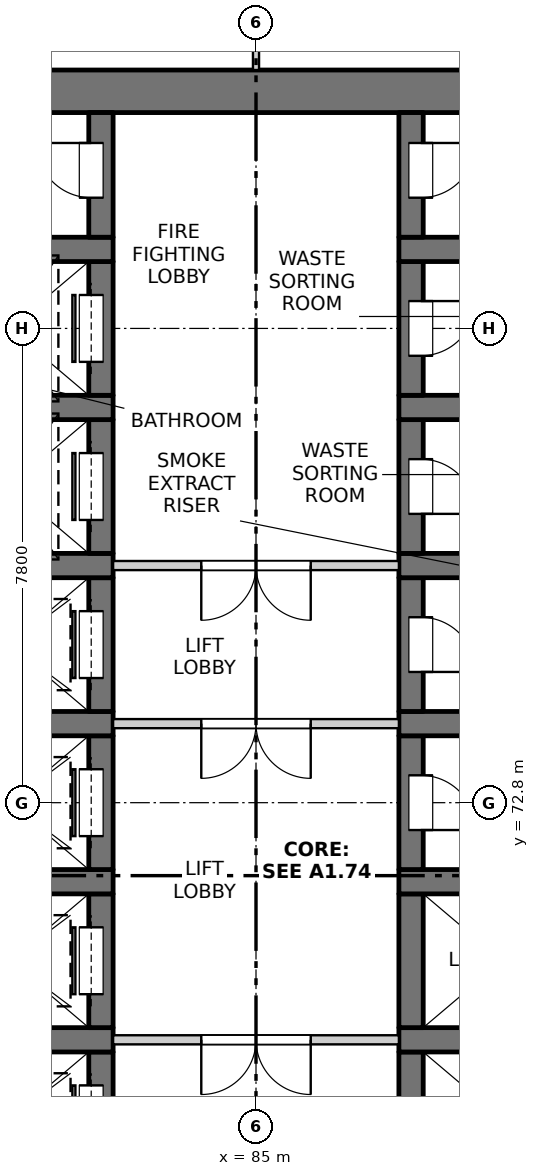
"""IFC4 building model, lengths in metres.
Left out: names, types, materials, properties, quantities, classifications, styles, units other than length and angle.
Written with IfcOpenShell. Run it as: python <this file> out.ifc"""

import sys

from ifc_helpers import new_model, si_unit, direction, frame, frame_2d, origin, place, context, subcontext, project, spatial, rectangle, extrude, element, fill, save


model = new_model("IFC4")
c1 = context("Model", 3, precision=1e-05, world=origin(), true_north=direction((0.0, 1.0)))
c2 = subcontext(c1, "Body", "Model", "MODEL_VIEW")
j1 = project(units=[si_unit("LENGTHUNIT", "METRE"), si_unit("PLANEANGLEUNIT", "RADIAN")], contexts=[c1])
p1 = place(None, origin())
s1 = spatial("IfcSite", under=j1, at=p1, CompositionType="ELEMENT")
p2 = place(p1, origin())
s2 = spatial("IfcBuilding", under=s1, at=p2, CompositionType="ELEMENT")
p3 = place(p2, frame((0.0, 0.0, 36.5)))
s3 = spatial("IfcBuildingStorey", under=s2, at=p3, CompositionType="ELEMENT", Elevation=36.5)
p4 = place(p3, frame((75.6, 84.5, -0.25), z_axis=(0.0, 0.0, 1.0), x_axis=(1.0, 0.0, 0.0)))
e1 = element("IfcWall", 1, at=p4, inside=s3, PredefinedType="SOLIDWALL", context=c2, shape_type="SweptSolid", body=[
    extrude(rectangle(XDim=18.8, YDim=0.7, at=frame_2d((9.4, 0.0))), origin(), (0.0, 0.0, 1.0), 3.4),
])
p5 = place(p3, frame((82.45, 66.5, -0.25), z_axis=(0.0, 0.0, 1.0), x_axis=(0.0, 1.0, 0.0)))
e2 = element("IfcWall", 2, at=p5, inside=s3, PredefinedType="SOLIDWALL", context=c2, shape_type="SweptSolid", body=[
    extrude(rectangle(XDim=2.2, YDim=0.4, at=frame_2d((1.1, 0.0))), origin(), (0.0, 0.0, 1.0), 3.4),
])
p6 = place(p5, frame((0.55, 0.0, 0.25)))
e3 = element("IfcOpeningElement", 3, at=p6, cuts=e2, PredefinedType="OPENING", context=c2, shape_type="SweptSolid", body=[
    extrude(rectangle(XDim=1.1, YDim=2.1, at=frame_2d((0.55, 1.05))), frame((0.0, 0.21, 0.0), z_axis=(0.0, -1.0, 0.0), x_axis=(1.0, 0.0, 0.0)), (0.0, 0.0, 1.0), 0.42),
])
p7 = place(p3, frame((79.65, 68.9, -0.25), z_axis=(0.0, 0.0, 1.0), x_axis=(1.0, 0.0, 0.0)))
e4 = element("IfcWall", 4, at=p7, inside=s3, PredefinedType="SOLIDWALL", context=c2, shape_type="SweptSolid", body=[
    extrude(rectangle(XDim=3.0, YDim=0.4, at=frame_2d((1.5, 0.0))), origin(), (0.0, 0.0, 1.0), 3.4),
])
p8 = place(p3, frame((82.45, 69.1, -0.25), z_axis=(0.0, 0.0, 1.0), x_axis=(0.0, 1.0, 0.0)))
e5 = element("IfcWall", 5, at=p8, inside=s3, PredefinedType="SOLIDWALL", context=c2, shape_type="SweptSolid", body=[
    extrude(rectangle(XDim=2.2, YDim=0.4, at=frame_2d((1.1, 0.0))), origin(), (0.0, 0.0, 1.0), 3.4),
])
p9 = place(p8, frame((0.55, 0.0, 0.25)))
e6 = element("IfcOpeningElement", 6, at=p9, cuts=e5, PredefinedType="OPENING", context=c2, shape_type="SweptSolid", body=[
    extrude(rectangle(XDim=1.1, YDim=2.1, at=frame_2d((0.55, 1.05))), frame((0.0, 0.21, 0.0), z_axis=(0.0, -1.0, 0.0), x_axis=(1.0, 0.0, 0.0)), (0.0, 0.0, 1.0), 0.42),
])
p10 = place(p3, frame((79.65, 71.5, -0.25), z_axis=(0.0, 0.0, 1.0), x_axis=(1.0, 0.0, 0.0)))
e7 = element("IfcWall", 7, at=p10, inside=s3, PredefinedType="SOLIDWALL", context=c2, shape_type="SweptSolid", body=[
    extrude(rectangle(XDim=3.0, YDim=0.4, at=frame_2d((1.5, 0.0))), origin(), (0.0, 0.0, 1.0), 3.4),
])
p11 = place(p3, frame((82.45, 71.7, -0.25), z_axis=(0.0, 0.0, 1.0), x_axis=(0.0, 1.0, 0.0)))
e8 = element("IfcWall", 8, at=p11, inside=s3, PredefinedType="SOLIDWALL", context=c2, shape_type="SweptSolid", body=[
    extrude(rectangle(XDim=2.2, YDim=0.4, at=frame_2d((1.1, 0.0))), origin(), (0.0, 0.0, 1.0), 3.4),
])
p12 = place(p11, frame((0.55, 0.0, 0.25)))
e9 = element("IfcOpeningElement", 9, at=p12, cuts=e8, PredefinedType="OPENING", context=c2, shape_type="SweptSolid", body=[
    extrude(rectangle(XDim=1.1, YDim=2.1, at=frame_2d((0.55, 1.05))), frame((0.0, 0.21, 0.0), z_axis=(0.0, -1.0, 0.0), x_axis=(1.0, 0.0, 0.0)), (0.0, 0.0, 1.0), 0.42),
])
p13 = place(p3, frame((79.65, 74.1, -0.25), z_axis=(0.0, 0.0, 1.0), x_axis=(1.0, 0.0, 0.0)))
e10 = element("IfcWall", 10, at=p13, inside=s3, PredefinedType="SOLIDWALL", context=c2, shape_type="SweptSolid", body=[
    extrude(rectangle(XDim=3.0, YDim=0.4, at=frame_2d((1.5, 0.0))), origin(), (0.0, 0.0, 1.0), 3.4),
])
p14 = place(p3, frame((82.45, 74.3, -0.25), z_axis=(0.0, 0.0, 1.0), x_axis=(0.0, 1.0, 0.0)))
e11 = element("IfcWall", 11, at=p14, inside=s3, PredefinedType="SOLIDWALL", context=c2, shape_type="SweptSolid", body=[
    extrude(rectangle(XDim=2.2, YDim=0.4, at=frame_2d((1.1, 0.0))), origin(), (0.0, 0.0, 1.0), 3.4),
])
p15 = place(p14, frame((0.55, 0.0, 0.25)))
e12 = element("IfcOpeningElement", 12, at=p15, cuts=e11, PredefinedType="OPENING", context=c2, shape_type="SweptSolid", body=[
    extrude(rectangle(XDim=1.1, YDim=2.1, at=frame_2d((0.55, 1.05))), frame((0.0, 0.21, 0.0), z_axis=(0.0, -1.0, 0.0), x_axis=(1.0, 0.0, 0.0)), (0.0, 0.0, 1.0), 0.42),
])
p16 = place(p3, frame((79.65, 76.7, -0.25), z_axis=(0.0, 0.0, 1.0), x_axis=(1.0, 0.0, 0.0)))
e13 = element("IfcWall", 13, at=p16, inside=s3, PredefinedType="SOLIDWALL", context=c2, shape_type="SweptSolid", body=[
    extrude(rectangle(XDim=3.0, YDim=0.4, at=frame_2d((1.5, 0.0))), origin(), (0.0, 0.0, 1.0), 3.4),
])
p17 = place(p3, frame((82.45, 76.9, -0.25), z_axis=(0.0, 0.0, 1.0), x_axis=(0.0, 1.0, 0.0)))
e14 = element("IfcWall", 14, at=p17, inside=s3, PredefinedType="SOLIDWALL", context=c2, shape_type="SweptSolid", body=[
    extrude(rectangle(XDim=2.2, YDim=0.4, at=frame_2d((1.1, 0.0))), origin(), (0.0, 0.0, 1.0), 3.4),
])
p18 = place(p17, frame((0.55, 0.0, 0.25)))
e15 = element("IfcOpeningElement", 15, at=p18, cuts=e14, PredefinedType="OPENING", context=c2, shape_type="SweptSolid", body=[
    extrude(rectangle(XDim=1.1, YDim=2.1, at=frame_2d((0.55, 1.05))), frame((0.0, 0.21, 0.0), z_axis=(0.0, -1.0, 0.0), x_axis=(1.0, 0.0, 0.0)), (0.0, 0.0, 1.0), 0.42),
])
p19 = place(p3, frame((79.65, 79.3, -0.25), z_axis=(0.0, 0.0, 1.0), x_axis=(1.0, 0.0, 0.0)))
e16 = element("IfcWall", 16, at=p19, inside=s3, PredefinedType="SOLIDWALL", context=c2, shape_type="SweptSolid", body=[
    extrude(rectangle(XDim=3.0, YDim=0.4, at=frame_2d((1.5, 0.0))), origin(), (0.0, 0.0, 1.0), 3.4),
])
p20 = place(p3, frame((82.45, 79.5, -0.25), z_axis=(0.0, 0.0, 1.0), x_axis=(0.0, 1.0, 0.0)))
e17 = element("IfcWall", 17, at=p20, inside=s3, PredefinedType="SOLIDWALL", context=c2, shape_type="SweptSolid", body=[
    extrude(rectangle(XDim=2.2, YDim=0.4, at=frame_2d((1.1, 0.0))), origin(), (0.0, 0.0, 1.0), 3.4),
])
p21 = place(p20, frame((0.55, 0.0, 0.25)))
e18 = element("IfcOpeningElement", 18, at=p21, cuts=e17, PredefinedType="OPENING", context=c2, shape_type="SweptSolid", body=[
    extrude(rectangle(XDim=1.1, YDim=2.1, at=frame_2d((0.55, 1.05))), frame((0.0, 0.21, 0.0), z_axis=(0.0, -1.0, 0.0), x_axis=(1.0, 0.0, 0.0)), (0.0, 0.0, 1.0), 0.42),
])
p22 = place(p3, frame((79.65, 81.9, -0.25), z_axis=(0.0, 0.0, 1.0), x_axis=(1.0, 0.0, 0.0)))
e19 = element("IfcWall", 19, at=p22, inside=s3, PredefinedType="SOLIDWALL", context=c2, shape_type="SweptSolid", body=[
    extrude(rectangle(XDim=3.0, YDim=0.4, at=frame_2d((1.5, 0.0))), origin(), (0.0, 0.0, 1.0), 3.4),
])
p23 = place(p3, frame((82.45, 82.1, -0.25), z_axis=(0.0, 0.0, 1.0), x_axis=(0.0, 1.0, 0.0)))
e20 = element("IfcWall", 20, at=p23, inside=s3, PredefinedType="SOLIDWALL", context=c2, shape_type="SweptSolid", body=[
    extrude(rectangle(XDim=2.05, YDim=0.4, at=frame_2d((1.025, 0.0))), origin(), (0.0, 0.0, 1.0), 3.4),
])
p24 = place(p23, frame((0.65, 0.0, 0.25)))
e21 = element("IfcOpeningElement", 21, at=p24, cuts=e20, PredefinedType="OPENING", context=c2, shape_type="SweptSolid", body=[
    extrude(rectangle(XDim=0.9, YDim=2.1, at=frame_2d((0.45, 1.05))), frame((0.0, 0.21, 0.0), z_axis=(0.0, -1.0, 0.0), x_axis=(1.0, 0.0, 0.0)), (0.0, 0.0, 1.0), 0.42),
])
p25 = place(p3, frame((87.55, 66.5, -0.25), z_axis=(0.0, 0.0, 1.0), x_axis=(0.0, 1.0, 0.0)))
e22 = element("IfcWall", 22, at=p25, inside=s3, PredefinedType="SOLIDWALL", context=c2, shape_type="SweptSolid", body=[
    extrude(rectangle(XDim=2.2, YDim=0.4, at=frame_2d((1.1, 0.0))), origin(), (0.0, 0.0, 1.0), 3.4),
])
p26 = place(p3, frame((87.35, 68.9, -0.25), z_axis=(0.0, 0.0, 1.0), x_axis=(1.0, 0.0, 0.0)))
e23 = element("IfcWall", 23, at=p26, inside=s3, PredefinedType="SOLIDWALL", context=c2, shape_type="SweptSolid", body=[
    extrude(rectangle(XDim=3.0, YDim=0.4, at=frame_2d((1.5, 0.0))), origin(), (0.0, 0.0, 1.0), 3.4),
])
p27 = place(p3, frame((87.55, 69.1, -0.25), z_axis=(0.0, 0.0, 1.0), x_axis=(0.0, 1.0, 0.0)))
e24 = element("IfcWall", 24, at=p27, inside=s3, PredefinedType="SOLIDWALL", context=c2, shape_type="SweptSolid", body=[
    extrude(rectangle(XDim=2.2, YDim=0.4, at=frame_2d((1.1, 0.0))), origin(), (0.0, 0.0, 1.0), 3.4),
])
p28 = place(p3, frame((87.35, 71.5, -0.25), z_axis=(0.0, 0.0, 1.0), x_axis=(1.0, 0.0, 0.0)))
e25 = element("IfcWall", 25, at=p28, inside=s3, PredefinedType="SOLIDWALL", context=c2, shape_type="SweptSolid", body=[
    extrude(rectangle(XDim=3.0, YDim=0.4, at=frame_2d((1.5, 0.0))), origin(), (0.0, 0.0, 1.0), 3.4),
])
p29 = place(p3, frame((87.55, 71.7, -0.25), z_axis=(0.0, 0.0, 1.0), x_axis=(0.0, 1.0, 0.0)))
e26 = element("IfcWall", 26, at=p29, inside=s3, PredefinedType="SOLIDWALL", context=c2, shape_type="SweptSolid", body=[
    extrude(rectangle(XDim=2.2, YDim=0.4, at=frame_2d((1.1, 0.0))), origin(), (0.0, 0.0, 1.0), 3.4),
])
p30 = place(p29, frame((0.65, 0.0, 0.25)))
e27 = element("IfcOpeningElement", 27, at=p30, cuts=e26, PredefinedType="OPENING", context=c2, shape_type="SweptSolid", body=[
    extrude(rectangle(XDim=0.9, YDim=2.1, at=frame_2d((0.45, 1.05))), frame((0.0, 0.21, 0.0), z_axis=(0.0, -1.0, 0.0), x_axis=(1.0, 0.0, 0.0)), (0.0, 0.0, 1.0), 0.42),
])
p31 = place(p3, frame((87.35, 74.1, -0.25), z_axis=(0.0, 0.0, 1.0), x_axis=(1.0, 0.0, 0.0)))
e28 = element("IfcWall", 28, at=p31, inside=s3, PredefinedType="SOLIDWALL", context=c2, shape_type="SweptSolid", body=[
    extrude(rectangle(XDim=3.0, YDim=0.4, at=frame_2d((1.5, 0.0))), origin(), (0.0, 0.0, 1.0), 3.4),
])
p32 = place(p3, frame((87.55, 74.3, -0.25), z_axis=(0.0, 0.0, 1.0), x_axis=(0.0, 1.0, 0.0)))
e29 = element("IfcWall", 29, at=p32, inside=s3, PredefinedType="SOLIDWALL", context=c2, shape_type="SweptSolid", body=[
    extrude(rectangle(XDim=2.2, YDim=0.4, at=frame_2d((1.1, 0.0))), origin(), (0.0, 0.0, 1.0), 3.4),
])
p33 = place(p32, frame((0.65, 0.0, 0.25)))
e30 = element("IfcOpeningElement", 30, at=p33, cuts=e29, PredefinedType="OPENING", context=c2, shape_type="SweptSolid", body=[
    extrude(rectangle(XDim=0.9, YDim=2.1, at=frame_2d((0.45, 1.05))), frame((0.0, 0.21, 0.0), z_axis=(0.0, -1.0, 0.0), x_axis=(1.0, 0.0, 0.0)), (0.0, 0.0, 1.0), 0.42),
])
p34 = place(p3, frame((87.35, 76.7, -0.25), z_axis=(0.0, 0.0, 1.0), x_axis=(1.0, 0.0, 0.0)))
e31 = element("IfcWall", 31, at=p34, inside=s3, PredefinedType="SOLIDWALL", context=c2, shape_type="SweptSolid", body=[
    extrude(rectangle(XDim=3.0, YDim=0.4, at=frame_2d((1.5, 0.0))), origin(), (0.0, 0.0, 1.0), 3.4),
])
p35 = place(p3, frame((87.55, 76.9, -0.25), z_axis=(0.0, 0.0, 1.0), x_axis=(0.0, 1.0, 0.0)))
e32 = element("IfcWall", 32, at=p35, inside=s3, PredefinedType="SOLIDWALL", context=c2, shape_type="SweptSolid", body=[
    extrude(rectangle(XDim=2.2, YDim=0.4, at=frame_2d((1.1, 0.0))), origin(), (0.0, 0.0, 1.0), 3.4),
])
p36 = place(p35, frame((0.65, 0.0, 0.25)))
e33 = element("IfcOpeningElement", 33, at=p36, cuts=e32, PredefinedType="OPENING", context=c2, shape_type="SweptSolid", body=[
    extrude(rectangle(XDim=0.9, YDim=2.1, at=frame_2d((0.45, 1.05))), frame((0.0, 0.21, 0.0), z_axis=(0.0, -1.0, 0.0), x_axis=(1.0, 0.0, 0.0)), (0.0, 0.0, 1.0), 0.42),
])
p37 = place(p3, frame((87.35, 79.3, -0.25), z_axis=(0.0, 0.0, 1.0), x_axis=(1.0, 0.0, 0.0)))
e34 = element("IfcWall", 34, at=p37, inside=s3, PredefinedType="SOLIDWALL", context=c2, shape_type="SweptSolid", body=[
    extrude(rectangle(XDim=3.0, YDim=0.4, at=frame_2d((1.5, 0.0))), origin(), (0.0, 0.0, 1.0), 3.4),
])
p38 = place(p3, frame((87.55, 79.5, -0.25), z_axis=(0.0, 0.0, 1.0), x_axis=(0.0, 1.0, 0.0)))
e35 = element("IfcWall", 35, at=p38, inside=s3, PredefinedType="SOLIDWALL", context=c2, shape_type="SweptSolid", body=[
    extrude(rectangle(XDim=2.2, YDim=0.4, at=frame_2d((1.1, 0.0))), origin(), (0.0, 0.0, 1.0), 3.4),
])
p39 = place(p38, frame((0.65, 0.0, 0.25)))
e36 = element("IfcOpeningElement", 36, at=p39, cuts=e35, PredefinedType="OPENING", context=c2, shape_type="SweptSolid", body=[
    extrude(rectangle(XDim=0.9, YDim=2.1, at=frame_2d((0.45, 1.05))), frame((0.0, 0.21, 0.0), z_axis=(0.0, -1.0, 0.0), x_axis=(1.0, 0.0, 0.0)), (0.0, 0.0, 1.0), 0.42),
])
p40 = place(p3, frame((87.35, 81.9, -0.25), z_axis=(0.0, 0.0, 1.0), x_axis=(1.0, 0.0, 0.0)))
e37 = element("IfcWall", 37, at=p40, inside=s3, PredefinedType="SOLIDWALL", context=c2, shape_type="SweptSolid", body=[
    extrude(rectangle(XDim=3.0, YDim=0.4, at=frame_2d((1.5, 0.0))), origin(), (0.0, 0.0, 1.0), 3.4),
])
p41 = place(p3, frame((87.55, 82.1, -0.25), z_axis=(0.0, 0.0, 1.0), x_axis=(0.0, 1.0, 0.0)))
e38 = element("IfcWall", 38, at=p41, inside=s3, PredefinedType="SOLIDWALL", context=c2, shape_type="SweptSolid", body=[
    extrude(rectangle(XDim=2.05, YDim=0.4, at=frame_2d((1.025, 0.0))), origin(), (0.0, 0.0, 1.0), 3.4),
])
p42 = place(p41, frame((0.65, 0.0, 0.25)))
e39 = element("IfcOpeningElement", 39, at=p42, cuts=e38, PredefinedType="OPENING", context=c2, shape_type="SweptSolid", body=[
    extrude(rectangle(XDim=0.9, YDim=2.1, at=frame_2d((0.45, 1.05))), frame((0.0, 0.21, 0.0), z_axis=(0.0, -1.0, 0.0), x_axis=(1.0, 0.0, 0.0)), (0.0, 0.0, 1.0), 0.42),
])
p43 = place(p3, frame((82.65, 68.9, 0.0), z_axis=(0.0, 0.0, 1.0), x_axis=(1.0, 0.0, 0.0)))
e40 = element("IfcWall", 40, at=p43, inside=s3, PredefinedType="PARTITIONING", context=c2, shape_type="SweptSolid", body=[
    extrude(rectangle(XDim=4.7, YDim=0.15, at=frame_2d((2.35, 0.0))), origin(), (0.0, 0.0, 1.0), 3.15),
])
p44 = place(p43, frame((1.45, 0.0, 0.0)))
e41 = element("IfcOpeningElement", 41, at=p44, cuts=e40, PredefinedType="OPENING", context=c2, shape_type="SweptSolid", body=[
    extrude(rectangle(XDim=1.8, YDim=2.1, at=frame_2d((0.9, 1.05))), frame((0.0, 0.085, 0.0), z_axis=(0.0, -1.0, 0.0), x_axis=(1.0, 0.0, 0.0)), (0.0, 0.0, 1.0), 0.17),
])
p45 = place(p3, frame((82.65, 74.1, 0.0), z_axis=(0.0, 0.0, 1.0), x_axis=(1.0, 0.0, 0.0)))
e42 = element("IfcWall", 42, at=p45, inside=s3, PredefinedType="PARTITIONING", context=c2, shape_type="SweptSolid", body=[
    extrude(rectangle(XDim=4.7, YDim=0.15, at=frame_2d((2.35, 0.0))), origin(), (0.0, 0.0, 1.0), 3.15),
])
p46 = place(p45, frame((1.45, 0.0, 0.0)))
e43 = element("IfcOpeningElement", 43, at=p46, cuts=e42, PredefinedType="OPENING", context=c2, shape_type="SweptSolid", body=[
    extrude(rectangle(XDim=1.8, YDim=2.1, at=frame_2d((0.9, 1.05))), frame((0.0, 0.085, 0.0), z_axis=(0.0, -1.0, 0.0), x_axis=(1.0, 0.0, 0.0)), (0.0, 0.0, 1.0), 0.17),
])
p47 = place(p3, frame((82.65, 76.7, 0.0), z_axis=(0.0, 0.0, 1.0), x_axis=(1.0, 0.0, 0.0)))
e44 = element("IfcWall", 44, at=p47, inside=s3, PredefinedType="PARTITIONING", context=c2, shape_type="SweptSolid", body=[
    extrude(rectangle(XDim=4.7, YDim=0.15, at=frame_2d((2.35, 0.0))), origin(), (0.0, 0.0, 1.0), 3.15),
])
p48 = place(p47, frame((1.45, 0.0, 0.0)))
e45 = element("IfcOpeningElement", 45, at=p48, cuts=e44, PredefinedType="OPENING", context=c2, shape_type="SweptSolid", body=[
    extrude(rectangle(XDim=1.8, YDim=2.1, at=frame_2d((0.9, 1.05))), frame((0.0, 0.085, 0.0), z_axis=(0.0, -1.0, 0.0), x_axis=(1.0, 0.0, 0.0)), (0.0, 0.0, 1.0), 0.17),
])
p49 = place(p3, frame((85.0, 84.85, 0.0), z_axis=(0.0, 0.0, 1.0), x_axis=(0.0, 1.0, 0.0)))
e46 = element("IfcWall", 46, at=p49, inside=s3, PredefinedType="PARTITIONING", context=c2, shape_type="SweptSolid", body=[
    extrude(rectangle(XDim=3.25, YDim=0.1, at=frame_2d((1.625, 0.0))), origin(), (0.0, 0.0, 1.0), 3.15),
])
p50 = place(p49, frame((1.15, 0.0, 0.0)))
e47 = element("IfcOpeningElement", 47, at=p50, cuts=e46, PredefinedType="OPENING", context=c2, shape_type="SweptSolid", body=[
    extrude(rectangle(XDim=0.9, YDim=2.1, at=frame_2d((0.45, 1.05))), frame((0.0, 0.06, 0.0), z_axis=(0.0, -1.0, 0.0), x_axis=(1.0, 0.0, 0.0)), (0.0, 0.0, 1.0), 0.12),
])
p51 = place(p6, origin())
e48 = element("IfcDoor", 48, at=p51, inside=s3, OperationType="SLIDING_TO_RIGHT", PredefinedType="DOOR", context=c2, shape_type="SweptSolid", body=[
    extrude(rectangle(XDim=1.1, YDim=2.1, at=frame_2d((0.55, 1.05))), frame((0.0, 0.185, 0.0), z_axis=(0.0, -1.0, 0.0), x_axis=(1.0, 0.0, 0.0)), (0.0, 0.0, 1.0), 0.05),
])
fill(e3, e48)
p52 = place(p44, origin())
e49 = element("IfcDoor", 49, at=p52, inside=s3, OperationType="DOUBLE_DOOR_SINGLE_SWING", PredefinedType="DOOR", context=c2, shape_type="SweptSolid", body=[
    extrude(rectangle(XDim=1.8, YDim=2.1, at=frame_2d((0.9, 1.05))), frame((0.0, 0.025, 0.0), z_axis=(0.0, -1.0, 0.0), x_axis=(1.0, 0.0, 0.0)), (0.0, 0.0, 1.0), 0.05),
])
fill(e41, e49)
p53 = place(p9, origin())
e50 = element("IfcDoor", 50, at=p53, inside=s3, OperationType="SLIDING_TO_LEFT", PredefinedType="DOOR", context=c2, shape_type="SweptSolid", body=[
    extrude(rectangle(XDim=1.1, YDim=2.1, at=frame_2d((0.55, 1.05))), frame((0.0, 0.185, 0.0), z_axis=(0.0, -1.0, 0.0), x_axis=(1.0, 0.0, 0.0)), (0.0, 0.0, 1.0), 0.05),
])
fill(e6, e50)
p54 = place(p12, origin())
e51 = element("IfcDoor", 51, at=p54, inside=s3, OperationType="SLIDING_TO_LEFT", PredefinedType="DOOR", context=c2, shape_type="SweptSolid", body=[
    extrude(rectangle(XDim=1.1, YDim=2.1, at=frame_2d((0.55, 1.05))), frame((0.0, 0.185, 0.0), z_axis=(0.0, -1.0, 0.0), x_axis=(1.0, 0.0, 0.0)), (0.0, 0.0, 1.0), 0.05),
])
fill(e9, e51)
p55 = place(p30, origin())
e52 = element("IfcDoor", 52, at=p55, inside=s3, OperationType="SINGLE_SWING_RIGHT", PredefinedType="DOOR", context=c2, shape_type="SweptSolid", body=[
    extrude(rectangle(XDim=0.9, YDim=2.1, at=frame_2d((0.45, 1.05))), frame((0.0, -0.135, 0.0), z_axis=(0.0, -1.0, 0.0), x_axis=(1.0, 0.0, 0.0)), (0.0, 0.0, 1.0), 0.05),
])
fill(e27, e52)
p56 = place(p46, origin())
e53 = element("IfcDoor", 53, at=p56, inside=s3, OperationType="DOUBLE_DOOR_SINGLE_SWING", PredefinedType="DOOR", context=c2, shape_type="SweptSolid", body=[
    extrude(rectangle(XDim=1.8, YDim=2.1, at=frame_2d((0.9, 1.05))), frame((0.0, 0.025, 0.0), z_axis=(0.0, -1.0, 0.0), x_axis=(1.0, 0.0, 0.0)), (0.0, 0.0, 1.0), 0.05),
])
fill(e43, e53)
p57 = place(p15, origin())
e54 = element("IfcDoor", 54, at=p57, inside=s3, OperationType="SLIDING_TO_LEFT", PredefinedType="DOOR", context=c2, shape_type="SweptSolid", body=[
    extrude(rectangle(XDim=1.1, YDim=2.1, at=frame_2d((0.55, 1.05))), frame((0.0, 0.185, 0.0), z_axis=(0.0, -1.0, 0.0), x_axis=(1.0, 0.0, 0.0)), (0.0, 0.0, 1.0), 0.05),
])
fill(e12, e54)
p58 = place(p33, origin())
e55 = element("IfcDoor", 55, at=p58, inside=s3, OperationType="SINGLE_SWING_RIGHT", PredefinedType="DOOR", context=c2, shape_type="SweptSolid", body=[
    extrude(rectangle(XDim=0.9, YDim=2.1, at=frame_2d((0.45, 1.05))), frame((0.0, -0.135, 0.0), z_axis=(0.0, -1.0, 0.0), x_axis=(1.0, 0.0, 0.0)), (0.0, 0.0, 1.0), 0.05),
])
fill(e30, e55)
p59 = place(p48, origin())
e56 = element("IfcDoor", 56, at=p59, inside=s3, OperationType="DOUBLE_DOOR_SINGLE_SWING", PredefinedType="DOOR", context=c2, shape_type="SweptSolid", body=[
    extrude(rectangle(XDim=1.8, YDim=2.1, at=frame_2d((0.9, 1.05))), frame((0.0, 0.025, 0.0), z_axis=(0.0, -1.0, 0.0), x_axis=(1.0, 0.0, 0.0)), (0.0, 0.0, 1.0), 0.05),
])
fill(e45, e56)
p60 = place(p18, origin())
e57 = element("IfcDoor", 57, at=p60, inside=s3, OperationType="SLIDING_TO_LEFT", PredefinedType="DOOR", context=c2, shape_type="SweptSolid", body=[
    extrude(rectangle(XDim=1.1, YDim=2.1, at=frame_2d((0.55, 1.05))), frame((0.0, 0.185, 0.0), z_axis=(0.0, -1.0, 0.0), x_axis=(1.0, 0.0, 0.0)), (0.0, 0.0, 1.0), 0.05),
])
fill(e15, e57)
p61 = place(p36, origin())
e58 = element("IfcDoor", 58, at=p61, inside=s3, OperationType="SINGLE_SWING_RIGHT", PredefinedType="DOOR", context=c2, shape_type="SweptSolid", body=[
    extrude(rectangle(XDim=0.9, YDim=2.1, at=frame_2d((0.45, 1.05))), frame((0.0, -0.135, 0.0), z_axis=(0.0, -1.0, 0.0), x_axis=(1.0, 0.0, 0.0)), (0.0, 0.0, 1.0), 0.05),
])
fill(e33, e58)
p62 = place(p21, origin())
e59 = element("IfcDoor", 59, at=p62, inside=s3, OperationType="SLIDING_TO_LEFT", PredefinedType="DOOR", context=c2, shape_type="SweptSolid", body=[
    extrude(rectangle(XDim=1.1, YDim=2.1, at=frame_2d((0.55, 1.05))), frame((0.0, 0.185, 0.0), z_axis=(0.0, -1.0, 0.0), x_axis=(1.0, 0.0, 0.0)), (0.0, 0.0, 1.0), 0.05),
])
fill(e18, e59)
p63 = place(p39, origin())
e60 = element("IfcDoor", 60, at=p63, inside=s3, OperationType="SINGLE_SWING_LEFT", PredefinedType="DOOR", context=c2, shape_type="SweptSolid", body=[
    extrude(rectangle(XDim=0.9, YDim=2.1, at=frame_2d((0.45, 1.05))), frame((0.0, -0.135, 0.0), z_axis=(0.0, -1.0, 0.0), x_axis=(1.0, 0.0, 0.0)), (0.0, 0.0, 1.0), 0.05),
])
fill(e36, e60)
p64 = place(p24, origin())
e61 = element("IfcDoor", 61, at=p64, inside=s3, OperationType="SINGLE_SWING_RIGHT", PredefinedType="DOOR", context=c2, shape_type="SweptSolid", body=[
    extrude(rectangle(XDim=0.9, YDim=2.1, at=frame_2d((0.45, 1.05))), frame((0.0, 0.185, 0.0), z_axis=(0.0, -1.0, 0.0), x_axis=(1.0, 0.0, 0.0)), (0.0, 0.0, 1.0), 0.05),
])
fill(e21, e61)
p65 = place(p42, origin())
e62 = element("IfcDoor", 62, at=p65, inside=s3, OperationType="SINGLE_SWING_LEFT", PredefinedType="DOOR", context=c2, shape_type="SweptSolid", body=[
    extrude(rectangle(XDim=0.9, YDim=2.1, at=frame_2d((0.45, 1.05))), frame((0.0, -0.135, 0.0), z_axis=(0.0, -1.0, 0.0), x_axis=(1.0, 0.0, 0.0)), (0.0, 0.0, 1.0), 0.05),
])
fill(e39, e62)
save(model, sys.argv[1])
